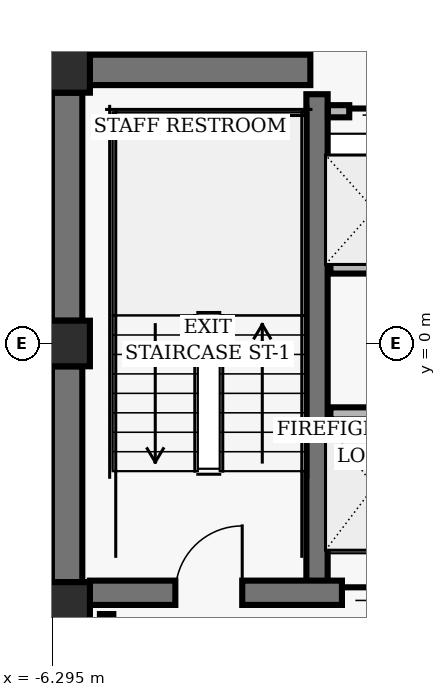
"""IFC4 building model, lengths in metres.
Left out: names, types, materials, properties, quantities, classifications, styles, units other than length and angle.
Written with IfcOpenShell. Run it as: python <this file> out.ifc"""

import sys

from ifc_helpers import new_model, si_unit, direction, frame, frame_2d, origin, origin_2d, place, context, subcontext, project, spatial, rectangle, hollow_rectangle, extrude, element, fill, save


model = new_model("IFC4")
c1 = context("Model", 3, precision=1e-05, world=origin(), true_north=direction((0.0, 1.0)))
c2 = subcontext(c1, "Body", "Model", "MODEL_VIEW")
j1 = project(units=[si_unit("LENGTHUNIT", "METRE"), si_unit("PLANEANGLEUNIT", "RADIAN")], contexts=[c1])
p1 = place(None, origin())
s1 = spatial("IfcSite", under=j1, at=p1, CompositionType="ELEMENT")
p2 = place(p1, origin())
s2 = spatial("IfcBuilding", under=s1, at=p2, CompositionType="ELEMENT")
p3 = place(p2, frame((0.0, 0.0, 187.52)))
s3 = spatial("IfcBuildingStorey", under=s2, at=p3, CompositionType="ELEMENT", Elevation=187.52)
for number, where, z_axis, x_axis in (
    (1, (-6.05, 4.5, 0.0), (0.0, 0.0, 1.0), (1.0, 0.0, 0.0)),
    (2, (-6.05, 0.0, 0.0), (0.0, 0.0, 1.0), (1.0, 0.0, 0.0)),
    (3, (-6.05, -4.3, 0.0), (0.0, 0.0, 1.0), (1.0, 0.0, 0.0)),
):
    element("IfcColumn", number, at=place(p3, frame(where, z_axis=z_axis, x_axis=x_axis)), inside=s3, PredefinedType="COLUMN", context=c2, shape_type="SweptSolid", body=[
        extrude(hollow_rectangle(XDim=0.75, YDim=0.75, WallThickness=0.05, InnerFilletRadius=0.02, OuterFilletRadius=0.04, at=origin_2d()), origin(), (0.0, 0.0, 1.0), 3.04),
    ])
p4 = place(p3, frame((-6.05, 0.375, 0.0), z_axis=(0.0, 0.0, 1.0), x_axis=(0.0, 1.0, 0.0)))
e4 = element("IfcWall", 4, at=p4, inside=s3, PredefinedType="SHEAR", context=c2, shape_type="SweptSolid", body=[
    extrude(rectangle(XDim=3.75, YDim=0.5, at=frame_2d((1.875, 0.0))), origin(), (0.0, 0.0, 1.0), 2.798),
])
p5 = place(p3, frame((-6.05, -3.925, 0.0), z_axis=(0.0, 0.0, 1.0), x_axis=(0.0, 1.0, 0.0)))
e5 = element("IfcWall", 5, at=p5, inside=s3, PredefinedType="SHEAR", context=c2, shape_type="SweptSolid", body=[
    extrude(rectangle(XDim=3.55, YDim=0.5, at=frame_2d((1.775, 0.0))), origin(), (0.0, 0.0, 1.0), 2.798),
])
p6 = place(p3, frame((-1.94, -4.1, 0.0), z_axis=(0.0, 0.0, 1.0), x_axis=(0.0, 1.0, 0.0)))
e6 = element("IfcWall", 6, at=p6, inside=s3, PredefinedType="SHEAR", context=c2, shape_type="SweptSolid", body=[
    extrude(rectangle(XDim=8.2, YDim=0.35, at=frame_2d((4.1, 0.0))), origin(), (0.0, 0.0, 1.0), 2.798),
])
p7 = place(p3, frame((-5.675, -4.1, 0.0), z_axis=(0.0, 0.0, 1.0), x_axis=(1.0, 0.0, 0.0)))
e7 = element("IfcWall", 7, at=p7, inside=s3, PredefinedType="SHEAR", context=c2, shape_type="SweptSolid", body=[
    extrude(rectangle(XDim=11.35, YDim=0.4, at=frame_2d((5.675, 0.0))), origin(), (0.0, 0.0, 1.0), 2.798),
])
p8 = place(p7, frame((1.405, 0.0, 0.0)))
e8 = element("IfcOpeningElement", 8, at=p8, cuts=e7, PredefinedType="OPENING", context=c2, shape_type="SweptSolid", body=[
    extrude(rectangle(XDim=1.1, YDim=2.04, at=frame_2d((0.55, 1.02))), frame((0.0, 0.21, 0.0), z_axis=(0.0, -1.0, 0.0), x_axis=(1.0, 0.0, 0.0)), (0.0, 0.0, 1.0), 0.42),
])
p9 = place(p7, frame((8.845, 0.0, 0.0)))
e9 = element("IfcOpeningElement", 9, at=p9, cuts=e7, PredefinedType="OPENING", context=c2, shape_type="SweptSolid", body=[
    extrude(rectangle(XDim=1.1, YDim=2.04, at=frame_2d((0.55, 1.02))), frame((0.0, 0.21, 0.0), z_axis=(0.0, -1.0, 0.0), x_axis=(1.0, 0.0, 0.0)), (0.0, 0.0, 1.0), 0.42),
])
p10 = place(p7, frame((4.145, 0.0, 0.0)))
e10 = element("IfcOpeningElement", 10, at=p10, cuts=e7, PredefinedType="OPENING", context=c2, shape_type="SweptSolid", body=[
    extrude(rectangle(XDim=1.06, YDim=2.04, at=frame_2d((0.53, 1.02))), frame((0.0, 0.21, 0.0), z_axis=(0.0, -1.0, 0.0), x_axis=(1.0, 0.0, 0.0)), (0.0, 0.0, 1.0), 0.42),
])
p11 = place(p7, frame((6.145, 0.0, 0.0)))
e11 = element("IfcOpeningElement", 11, at=p11, cuts=e7, PredefinedType="OPENING", context=c2, shape_type="SweptSolid", body=[
    extrude(rectangle(XDim=1.06, YDim=2.04, at=frame_2d((0.53, 1.02))), frame((0.0, 0.21, 0.0), z_axis=(0.0, -1.0, 0.0), x_axis=(1.0, 0.0, 0.0)), (0.0, 0.0, 1.0), 0.42),
])
p12 = place(p3, frame((-5.675, 4.5, 0.0), z_axis=(0.0, 0.0, 1.0), x_axis=(1.0, 0.0, 0.0)))
e12 = element("IfcWall", 12, at=p12, inside=s3, PredefinedType="SHEAR", context=c2, shape_type="SweptSolid", body=[
    extrude(rectangle(XDim=3.625, YDim=0.5, at=frame_2d((1.812, 0.0))), origin(), (0.0, 0.0, 1.0), 2.798),
])
p13 = place(p3, frame((-1.72, -1.15, 0.0), z_axis=(0.0, 0.0, 1.0), x_axis=(1.0, 0.0, 0.0)))
e13 = element("IfcWall", 13, at=p13, inside=s3, PredefinedType="PARTITIONING", context=c2, shape_type="SweptSolid", body=[
    extrude(rectangle(XDim=3.44, YDim=0.2, at=frame_2d((1.72, 0.0))), origin(), (0.0, 0.0, 1.0), 2.773),
])
p14 = place(p3, frame((-5.4, -7.16, 0.0), z_axis=(0.0, 0.0, 1.0), x_axis=(0.0, 1.0, 0.0)))
e14 = element("IfcWall", 14, at=p14, inside=s3, PredefinedType="PARTITIONING", context=c2, shape_type="SweptSolid", body=[
    extrude(rectangle(XDim=2.71, YDim=0.22, at=frame_2d((1.355, 0.0))), origin(), (0.0, 0.0, 1.0), 2.773),
])
p15 = place(p3, frame((-1.72, 1.25, 0.0), z_axis=(0.0, 0.0, 1.0), x_axis=(1.0, 0.0, 0.0)))
e15 = element("IfcWall", 15, at=p15, inside=s3, PredefinedType="PARTITIONING", context=c2, shape_type="SweptSolid", body=[
    extrude(rectangle(XDim=3.44, YDim=0.2, at=frame_2d((1.72, 0.0))), origin(), (0.0, 0.0, 1.0), 2.773),
])
p16 = place(p3, frame((-1.76, 3.82, 0.0), z_axis=(0.0, 0.0, 1.0), x_axis=(1.0, 0.0, 0.0)))
e16 = element("IfcWall", 16, at=p16, inside=s3, PredefinedType="PARTITIONING", context=c2, shape_type="SweptSolid", body=[
    extrude(rectangle(XDim=3.52, YDim=0.2, at=frame_2d((1.76, 0.0))), origin(), (0.0, 0.0, 1.0), 2.773),
])
p17 = place(p16, frame((0.35, 0.0, 0.0)))
e17 = element("IfcOpeningElement", 17, at=p17, cuts=e16, PredefinedType="OPENING", context=c2, shape_type="SweptSolid", body=[
    extrude(rectangle(XDim=1.06, YDim=2.04, at=frame_2d((0.53, 1.02))), frame((0.0, 0.11, 0.0), z_axis=(0.0, -1.0, 0.0), x_axis=(1.0, 0.0, 0.0)), (0.0, 0.0, 1.0), 0.22),
])
p18 = place(p16, frame((2.11, 0.0, 0.0)))
e18 = element("IfcOpeningElement", 18, at=p18, cuts=e16, PredefinedType="OPENING", context=c2, shape_type="SweptSolid", body=[
    extrude(rectangle(XDim=1.06, YDim=2.04, at=frame_2d((0.53, 1.02))), frame((0.0, 0.11, 0.0), z_axis=(0.0, -1.0, 0.0), x_axis=(1.0, 0.0, 0.0)), (0.0, 0.0, 1.0), 0.22),
])
p19 = place(p8, origin())
e19 = element("IfcDoor", 19, at=p19, inside=s3, OperationType="SINGLE_SWING_RIGHT", PredefinedType="DOOR", context=c2, shape_type="SweptSolid", body=[
    extrude(rectangle(XDim=1.1, YDim=2.04, at=frame_2d((0.55, 1.02))), frame((0.0, 0.025, 0.0), z_axis=(0.0, -1.0, 0.0), x_axis=(1.0, 0.0, 0.0)), (0.0, 0.0, 1.0), 0.05),
])
fill(e8, e19)
p20 = place(p10, origin())
e20 = element("IfcDoor", 20, at=p20, inside=s3, OperationType="SLIDING_TO_LEFT", PredefinedType="DOOR", context=c2, shape_type="SweptSolid", body=[
    extrude(rectangle(XDim=1.06, YDim=2.04, at=frame_2d((0.53, 1.02))), frame((0.0, 0.025, 0.0), z_axis=(0.0, -1.0, 0.0), x_axis=(1.0, 0.0, 0.0)), (0.0, 0.0, 1.0), 0.05),
])
fill(e10, e20)
p21 = place(p17, origin())
e21 = element("IfcDoor", 21, at=p21, inside=s3, OperationType="SLIDING_TO_LEFT", PredefinedType="DOOR", context=c2, shape_type="SweptSolid", body=[
    extrude(rectangle(XDim=1.06, YDim=2.04, at=frame_2d((0.53, 1.02))), frame((0.0, 0.025, 0.0), z_axis=(0.0, -1.0, 0.0), x_axis=(1.0, 0.0, 0.0)), (0.0, 0.0, 1.0), 0.05),
])
fill(e17, e21)
save(model, sys.argv[1])
